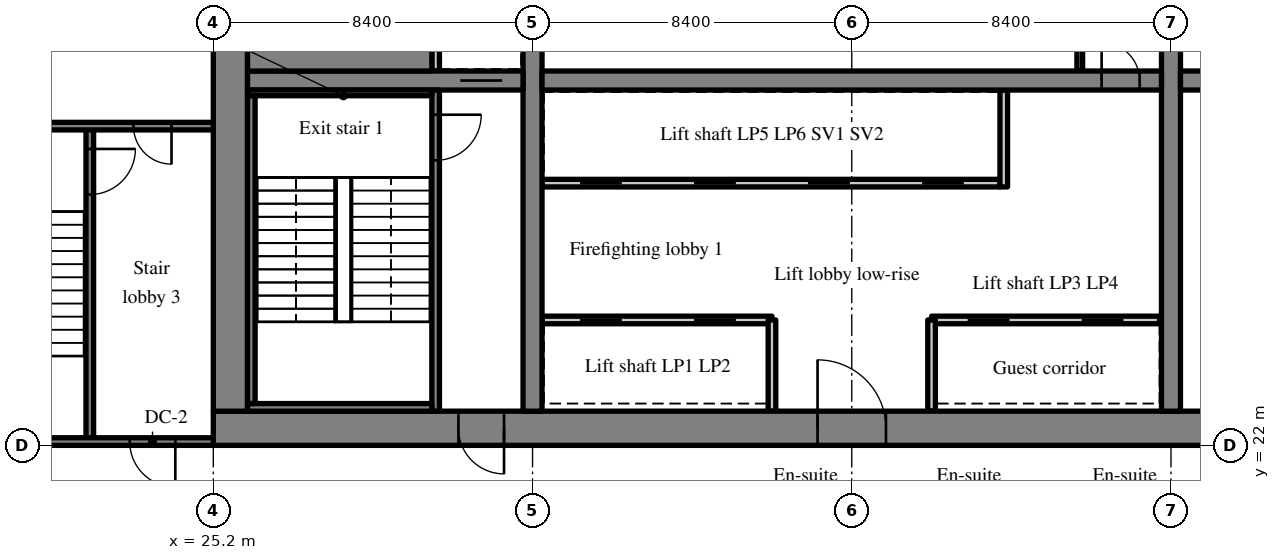
"""IFC4 building model, lengths in metres.
Left out: names, types, materials, properties, quantities, classifications, styles, units other than length and angle.
Written with IfcOpenShell. Run it as: python <this file> out.ifc"""

import sys

from ifc_helpers import new_model, si_unit, direction, frame, frame_2d, origin, place, context, subcontext, project, spatial, rectangle, extrude, source, transform, mapped, element, fill, save


model = new_model("IFC4")
c1 = context("Model", 3, precision=1e-05, world=origin(), true_north=direction((0.0, 1.0)))
c2 = subcontext(c1, "Body", "Model", "MODEL_VIEW")
j1 = project(units=[si_unit("LENGTHUNIT", "METRE"), si_unit("PLANEANGLEUNIT", "RADIAN")], contexts=[c1])
p1 = place(None, origin())
s1 = spatial("IfcSite", under=j1, at=p1, CompositionType="ELEMENT")
p2 = place(p1, origin())
s2 = spatial("IfcBuilding", under=s1, at=p2, CompositionType="ELEMENT")
p3 = place(p2, frame((0.0, 0.0, 125.6)))
s3 = spatial("IfcBuildingStorey", under=s2, at=p3, CompositionType="ELEMENT", Elevation=125.6)
m1 = source(origin(), c2, "Body", "SweptSolid", [
    extrude(rectangle(XDim=50.4, YDim=0.9, at=frame_2d((25.2, 0.0))), origin(), (0.0, 0.0, 1.0), 3.52),
])
p4 = place(p3, frame((25.2, 22.45, 0.0), z_axis=(0.0, 0.0, 1.0), x_axis=(1.0, 0.0, 0.0)))
e1 = element("IfcWall", 1, at=p4, inside=s3, PredefinedType="SHEAR", context=c2, shape_type="MappedRepresentation", body=[
    mapped(m1, transform((0.0, 0.0, 0.0), scale=1.0)),
])
m2 = source(origin(), c2, "Body", "SweptSolid", [
    extrude(rectangle(XDim=1.8, YDim=2.1, at=frame_2d((0.9, 1.05))), frame((0.0, 0.46, 0.0), z_axis=(0.0, -1.0, 0.0), x_axis=(1.0, 0.0, 0.0)), (0.0, 0.0, 1.0), 0.92),
])
p5 = place(p4, frame((15.9, 0.0, 0.0)))
e2 = element("IfcOpeningElement", 2, at=p5, cuts=e1, PredefinedType="OPENING", context=c2, shape_type="MappedRepresentation", body=[
    mapped(m2, transform((0.0, 0.0, 0.0), scale=1.0)),
])
m3 = source(origin(), c2, "Body", "SweptSolid", [
    extrude(rectangle(XDim=1.2, YDim=2.1, at=frame_2d((0.6, 1.05))), frame((0.0, 0.46, 0.0), z_axis=(0.0, -1.0, 0.0), x_axis=(1.0, 0.0, 0.0)), (0.0, 0.0, 1.0), 0.92),
])
p6 = place(p4, frame((26.975, 0.0, 0.0)))
e3 = element("IfcOpeningElement", 3, at=p6, cuts=e1, PredefinedType="OPENING", context=c2, shape_type="MappedRepresentation", body=[
    mapped(m3, transform((0.0, 0.0, 0.0), scale=1.0)),
])
m4 = source(origin(), c2, "Body", "SweptSolid", [
    extrude(rectangle(XDim=0.9, YDim=2.1, at=frame_2d((0.45, 1.05))), frame((0.0, 0.46, 0.0), z_axis=(0.0, -1.0, 0.0), x_axis=(1.0, 0.0, 0.0)), (0.0, 0.0, 1.0), 0.92),
])
p7 = place(p4, frame((33.75, 0.0, 0.0)))
e4 = element("IfcOpeningElement", 4, at=p7, cuts=e1, PredefinedType="OPENING", context=c2, shape_type="MappedRepresentation", body=[
    mapped(m4, transform((0.0, 0.0, 0.0), scale=1.0)),
])
p8 = place(p4, frame((30.75, 0.0, 0.0)))
e5 = element("IfcOpeningElement", 5, at=p8, cuts=e1, PredefinedType="OPENING", context=c2, shape_type="MappedRepresentation", body=[
    mapped(m4, transform((0.0, 0.0, 0.0), scale=1.0)),
])
p9 = place(p4, frame((38.275, 0.0, 0.0)))
e6 = element("IfcOpeningElement", 6, at=p9, cuts=e1, PredefinedType="OPENING", context=c2, shape_type="MappedRepresentation", body=[
    mapped(m4, transform((0.0, 0.0, 0.0), scale=1.0)),
])
p10 = place(p4, frame((6.45, 0.0, 0.0)))
e7 = element("IfcOpeningElement", 7, at=p10, cuts=e1, PredefinedType="OPENING", context=c2, shape_type="MappedRepresentation", body=[
    mapped(m3, transform((0.0, 0.0, 0.0), scale=1.0)),
])
p11 = place(p4, frame((47.775, 0.0, 0.0)))
e8 = element("IfcOpeningElement", 8, at=p11, cuts=e1, PredefinedType="OPENING", context=c2, shape_type="MappedRepresentation", body=[
    mapped(m3, transform((0.0, 0.0, 0.0), scale=1.0)),
])
m5 = source(origin(), c2, "Body", "SweptSolid", [
    extrude(rectangle(XDim=18.2, YDim=0.9, at=frame_2d((9.1, 0.0))), origin(), (0.0, 0.0, 1.0), 3.52),
])
p12 = place(p3, frame((25.65, 22.9, 0.0), z_axis=(0.0, 0.0, 1.0), x_axis=(0.0, 1.0, 0.0)))
e9 = element("IfcWall", 9, at=p12, inside=s3, PredefinedType="SHEAR", context=c2, shape_type="MappedRepresentation", body=[
    mapped(m5, transform((0.0, 0.0, 0.0), scale=1.0)),
])
m6 = source(origin(), c2, "Body", "SweptSolid", [
    extrude(rectangle(XDim=18.2, YDim=0.5, at=frame_2d((9.1, 0.0))), origin(), (0.0, 0.0, 1.0), 3.52),
])
p13 = place(p3, frame((33.6, 22.9, 0.0), z_axis=(0.0, 0.0, 1.0), x_axis=(0.0, 1.0, 0.0)))
e10 = element("IfcWall", 10, at=p13, inside=s3, PredefinedType="SHEAR", context=c2, shape_type="MappedRepresentation", body=[
    mapped(m6, transform((0.0, 0.0, 0.0), scale=1.0)),
])
m7 = source(origin(), c2, "Body", "SweptSolid", [
    extrude(rectangle(XDim=1.1, YDim=2.1, at=frame_2d((0.55, 1.05))), frame((0.0, 0.26, 0.0), z_axis=(0.0, -1.0, 0.0), x_axis=(1.0, 0.0, 0.0)), (0.0, 0.0, 1.0), 0.52),
])
p14 = place(p13, frame((12.55, 0.0, 0.0)))
e11 = element("IfcOpeningElement", 11, at=p14, cuts=e10, PredefinedType="OPENING", context=c2, shape_type="MappedRepresentation", body=[
    mapped(m7, transform((0.0, 0.0, 0.0), scale=1.0)),
])
p15 = place(p3, frame((50.4, 22.9, 0.0), z_axis=(0.0, 0.0, 1.0), x_axis=(0.0, 1.0, 0.0)))
e12 = element("IfcWall", 12, at=p15, inside=s3, PredefinedType="SHEAR", context=c2, shape_type="MappedRepresentation", body=[
    mapped(m6, transform((0.0, 0.0, 0.0), scale=1.0)),
])
p16 = place(p15, frame((12.55, 0.0, 0.0)))
e13 = element("IfcOpeningElement", 13, at=p16, cuts=e12, PredefinedType="OPENING", context=c2, shape_type="MappedRepresentation", body=[
    mapped(m7, transform((0.0, 0.0, 0.0), scale=1.0)),
])
m8 = source(origin(), c2, "Body", "SweptSolid", [
    extrude(rectangle(XDim=7.25, YDim=0.5, at=frame_2d((3.625, 0.0))), origin(), (0.0, 0.0, 1.0), 3.52),
])
p17 = place(p3, frame((26.1, 31.6, 0.0), z_axis=(0.0, 0.0, 1.0), x_axis=(1.0, 0.0, 0.0)))
e14 = element("IfcWall", 14, at=p17, inside=s3, PredefinedType="SHEAR", context=c2, shape_type="MappedRepresentation", body=[
    mapped(m8, transform((0.0, 0.0, 0.0), scale=1.0)),
])
p18 = place(p17, frame((5.6, 0.0, 0.0)))
e15 = element("IfcOpeningElement", 15, at=p18, cuts=e14, PredefinedType="OPENING", context=c2, shape_type="MappedRepresentation", body=[
    mapped(m7, transform((0.0, 0.0, 0.0), scale=1.0)),
])
m9 = source(origin(), c2, "Body", "SweptSolid", [
    extrude(rectangle(XDim=16.3, YDim=0.5, at=frame_2d((8.15, 0.0))), origin(), (0.0, 0.0, 1.0), 3.52),
])
p19 = place(p3, frame((33.85, 31.6, 0.0), z_axis=(0.0, 0.0, 1.0), x_axis=(1.0, 0.0, 0.0)))
e16 = element("IfcWall", 16, at=p19, inside=s3, PredefinedType="SHEAR", context=c2, shape_type="MappedRepresentation", body=[
    mapped(m9, transform((0.0, 0.0, 0.0), scale=1.0)),
])
m10 = source(origin(), c2, "Body", "SweptSolid", [
    extrude(rectangle(XDim=1.0, YDim=2.1, at=frame_2d((0.5, 1.05))), frame((0.0, 0.26, 0.0), z_axis=(0.0, -1.0, 0.0), x_axis=(1.0, 0.0, 0.0)), (0.0, 0.0, 1.0), 0.52),
])
p20 = place(p19, frame((14.725, 0.0, 0.0)))
e17 = element("IfcOpeningElement", 17, at=p20, cuts=e16, PredefinedType="OPENING", context=c2, shape_type="MappedRepresentation", body=[
    mapped(m10, transform((0.0, 0.0, 0.0), scale=1.0)),
])
m11 = source(origin(), c2, "Body", "SweptSolid", [
    extrude(rectangle(XDim=16.3, YDim=0.5, at=frame_2d((8.15, 0.0))), origin(), (0.0, 0.0, 1.0), 3.52),
])
p21 = place(p3, frame((50.65, 31.6, 0.0), z_axis=(0.0, 0.0, 1.0), x_axis=(1.0, 0.0, 0.0)))
e18 = element("IfcWall", 18, at=p21, inside=s3, PredefinedType="SHEAR", context=c2, shape_type="MappedRepresentation", body=[
    mapped(m11, transform((0.0, 0.0, 0.0), scale=1.0)),
])
p22 = place(p21, frame((0.575, 0.0, 0.0)))
e19 = element("IfcOpeningElement", 19, at=p22, cuts=e18, PredefinedType="OPENING", context=c2, shape_type="MappedRepresentation", body=[
    mapped(m10, transform((0.0, 0.0, 0.0), scale=1.0)),
])
m12 = source(origin(), c2, "Body", "SweptSolid", [
    extrude(rectangle(XDim=6.05, YDim=0.2, at=frame_2d((3.025, 0.0))), origin(), (0.0, 0.0, 1.0), 3.52),
])
p23 = place(p3, frame((33.85, 25.3, 0.0), z_axis=(0.0, 0.0, 1.0), x_axis=(1.0, 0.0, 0.0)))
e20 = element("IfcWall", 20, at=p23, inside=s3, PredefinedType="SOLIDWALL", context=c2, shape_type="MappedRepresentation", body=[
    mapped(m12, transform((0.0, 0.0, 0.0), scale=1.0)),
])
m13 = source(origin(), c2, "Body", "SweptSolid", [
    extrude(rectangle(XDim=1.1, YDim=2.1, at=frame_2d((0.55, 1.05))), frame((0.0, 0.11, 0.0), z_axis=(0.0, -1.0, 0.0), x_axis=(1.0, 0.0, 0.0)), (0.0, 0.0, 1.0), 0.22),
])
p24 = place(p23, frame((1.0, 0.0, 0.0)))
e21 = element("IfcOpeningElement", 21, at=p24, cuts=e20, PredefinedType="OPENING", context=c2, shape_type="MappedRepresentation", body=[
    mapped(m13, transform((0.0, 0.0, 0.0), scale=1.0)),
])
p25 = place(p23, frame((4.0, 0.0, 0.0)))
e22 = element("IfcOpeningElement", 22, at=p25, cuts=e20, PredefinedType="OPENING", context=c2, shape_type="MappedRepresentation", body=[
    mapped(m13, transform((0.0, 0.0, 0.0), scale=1.0)),
])
m14 = source(origin(), c2, "Body", "SweptSolid", [
    extrude(rectangle(XDim=6.0, YDim=0.2, at=frame_2d((3.0, 0.0))), origin(), (0.0, 0.0, 1.0), 3.52),
])
p26 = place(p3, frame((44.1, 25.3, 0.0), z_axis=(0.0, 0.0, 1.0), x_axis=(1.0, 0.0, 0.0)))
e23 = element("IfcWall", 23, at=p26, inside=s3, PredefinedType="SOLIDWALL", context=c2, shape_type="MappedRepresentation", body=[
    mapped(m14, transform((0.0, 0.0, 0.0), scale=1.0)),
])
p27 = place(p26, frame((0.95, 0.0, 0.0)))
e24 = element("IfcOpeningElement", 24, at=p27, cuts=e23, PredefinedType="OPENING", context=c2, shape_type="MappedRepresentation", body=[
    mapped(m13, transform((0.0, 0.0, 0.0), scale=1.0)),
])
p28 = place(p26, frame((3.95, 0.0, 0.0)))
e25 = element("IfcOpeningElement", 25, at=p28, cuts=e23, PredefinedType="OPENING", context=c2, shape_type="MappedRepresentation", body=[
    mapped(m13, transform((0.0, 0.0, 0.0), scale=1.0)),
])
m15 = source(origin(), c2, "Body", "SweptSolid", [
    extrude(rectangle(XDim=12.05, YDim=0.2, at=frame_2d((6.025, 0.0))), origin(), (0.0, 0.0, 1.0), 3.52),
])
p29 = place(p3, frame((33.85, 28.9, 0.0), z_axis=(0.0, 0.0, 1.0), x_axis=(1.0, 0.0, 0.0)))
e26 = element("IfcWall", 26, at=p29, inside=s3, PredefinedType="SOLIDWALL", context=c2, shape_type="MappedRepresentation", body=[
    mapped(m15, transform((0.0, 0.0, 0.0), scale=1.0)),
])
p30 = place(p29, frame((1.0, 0.0, 0.0)))
e27 = element("IfcOpeningElement", 27, at=p30, cuts=e26, PredefinedType="OPENING", context=c2, shape_type="MappedRepresentation", body=[
    mapped(m13, transform((0.0, 0.0, 0.0), scale=1.0)),
])
p31 = place(p29, frame((4.0, 0.0, 0.0)))
e28 = element("IfcOpeningElement", 28, at=p31, cuts=e26, PredefinedType="OPENING", context=c2, shape_type="MappedRepresentation", body=[
    mapped(m13, transform((0.0, 0.0, 0.0), scale=1.0)),
])
p32 = place(p29, frame((7.0, 0.0, 0.0)))
e29 = element("IfcOpeningElement", 29, at=p32, cuts=e26, PredefinedType="OPENING", context=c2, shape_type="MappedRepresentation", body=[
    mapped(m13, transform((0.0, 0.0, 0.0), scale=1.0)),
])
p33 = place(p29, frame((10.0, 0.0, 0.0)))
e30 = element("IfcOpeningElement", 30, at=p33, cuts=e26, PredefinedType="OPENING", context=c2, shape_type="MappedRepresentation", body=[
    mapped(m13, transform((0.0, 0.0, 0.0), scale=1.0)),
])
m16 = source(origin(), c2, "Body", "SweptSolid", [
    extrude(rectangle(XDim=2.4, YDim=0.2, at=frame_2d((1.2, 0.0))), origin(), (0.0, 0.0, 1.0), 3.52),
])
for number, where, z_axis, x_axis in (
    (31, (39.9, 22.9, 0.0), (0.0, 0.0, 1.0), (0.0, 1.0, 0.0)),
    (32, (44.1, 22.9, 0.0), (0.0, 0.0, 1.0), (0.0, 1.0, 0.0)),
):
    element("IfcWall", number, at=place(p3, frame(where, z_axis=z_axis, x_axis=x_axis)), inside=s3, PredefinedType="SOLIDWALL", context=c2, shape_type="MappedRepresentation", body=[
        mapped(m16, transform((0.0, 0.0, 0.0), scale=1.0)),
    ])
m17 = source(origin(), c2, "Body", "SweptSolid", [
    extrude(rectangle(XDim=2.55, YDim=0.2, at=frame_2d((1.275, 0.0))), origin(), (0.0, 0.0, 1.0), 3.52),
])
p34 = place(p3, frame((46.0, 28.8, 0.0), z_axis=(0.0, 0.0, 1.0), x_axis=(0.0, 1.0, 0.0)))
e33 = element("IfcWall", 33, at=p34, inside=s3, PredefinedType="SOLIDWALL", context=c2, shape_type="MappedRepresentation", body=[
    mapped(m17, transform((0.0, 0.0, 0.0), scale=1.0)),
])
m18 = source(origin(), c2, "Body", "SweptSolid", [
    extrude(rectangle(XDim=3.15, YDim=0.15, at=frame_2d((1.575, 0.0))), origin(), (0.0, 0.0, 1.0), 3.52),
])
p35 = place(p3, frame((48.0, 31.85, 0.0), z_axis=(0.0, 0.0, 1.0), x_axis=(0.0, 1.0, 0.0)))
e34 = element("IfcWall", 34, at=p35, inside=s3, PredefinedType="PARTITIONING", context=c2, shape_type="MappedRepresentation", body=[
    mapped(m18, transform((0.0, 0.0, 0.0), scale=1.0)),
])
m19 = source(origin(), c2, "Body", "SweptSolid", [
    extrude(rectangle(XDim=8.45, YDim=0.2, at=frame_2d((4.225, 0.0))), origin(), (0.0, 0.0, 1.0), 3.52),
])
p36 = place(p3, frame((31.05, 22.9, 0.0), z_axis=(0.0, 0.0, 1.0), x_axis=(0.0, 1.0, 0.0)))
e35 = element("IfcWall", 35, at=p36, inside=s3, PredefinedType="SOLIDWALL", context=c2, shape_type="MappedRepresentation", body=[
    mapped(m19, transform((0.0, 0.0, 0.0), scale=1.0)),
])
m20 = source(origin(), c2, "Body", "SweptSolid", [
    extrude(rectangle(XDim=1.2, YDim=2.1, at=frame_2d((0.6, 1.05))), frame((0.0, 0.11, 0.0), z_axis=(0.0, -1.0, 0.0), x_axis=(1.0, 0.0, 0.0)), (0.0, 0.0, 1.0), 0.22),
])
p37 = place(p36, frame((6.6, 0.0, 0.0)))
e36 = element("IfcOpeningElement", 36, at=p37, cuts=e35, PredefinedType="OPENING", context=c2, shape_type="MappedRepresentation", body=[
    mapped(m20, transform((0.0, 0.0, 0.0), scale=1.0)),
])
m21 = source(origin(), c2, "Body", "SweptSolid", [
    extrude(rectangle(XDim=1.75, YDim=0.2, at=frame_2d((0.875, 0.0))), origin(), (0.0, 0.0, 1.0), 3.52),
])
p38 = place(p3, frame((31.05, 31.85, 0.0), z_axis=(0.0, 0.0, 1.0), x_axis=(0.0, 1.0, 0.0)))
e37 = element("IfcWall", 37, at=p38, inside=s3, PredefinedType="SOLIDWALL", context=c2, shape_type="MappedRepresentation", body=[
    mapped(m21, transform((0.0, 0.0, 0.0), scale=1.0)),
])
m22 = source(origin(), c2, "Body", "SweptSolid", [
    extrude(rectangle(XDim=8.3, YDim=0.2, at=frame_2d((4.15, 0.0))), origin(), (0.0, 0.0, 1.0), 3.52),
])
p39 = place(p3, frame((21.95, 22.1, 0.0), z_axis=(0.0, 0.0, 1.0), x_axis=(0.0, 1.0, 0.0)))
e38 = element("IfcWall", 38, at=p39, inside=s3, PredefinedType="SOLIDWALL", context=c2, shape_type="MappedRepresentation", body=[
    mapped(m22, transform((0.0, 0.0, 0.0), scale=1.0)),
])
p40 = place(p39, frame((6.5, 0.0, 0.0)))
e39 = element("IfcOpeningElement", 39, at=p40, cuts=e38, PredefinedType="OPENING", context=c2, shape_type="MappedRepresentation", body=[
    mapped(m20, transform((0.0, 0.0, 0.0), scale=1.0)),
])
m23 = source(origin(), c2, "Body", "SweptSolid", [
    extrude(rectangle(XDim=8.225, YDim=0.2, at=frame_2d((4.112, 0.0))), origin(), (0.0, 0.0, 1.0), 3.52),
])
p41 = place(p3, frame((16.975, 22.1, 0.0), z_axis=(0.0, 0.0, 1.0), x_axis=(1.0, 0.0, 0.0)))
e40 = element("IfcWall", 40, at=p41, inside=s3, PredefinedType="SOLIDWALL", context=c2, shape_type="MappedRepresentation", body=[
    mapped(m23, transform((0.0, 0.0, 0.0), scale=1.0)),
])
p42 = place(p41, frame((6.025, 0.0, 0.0)))
e41 = element("IfcOpeningElement", 41, at=p42, cuts=e40, PredefinedType="OPENING", context=c2, shape_type="MappedRepresentation", body=[
    mapped(m20, transform((0.0, 0.0, 0.0), scale=1.0)),
])
p43 = place(p3, frame((16.975, 30.4, 0.0), z_axis=(0.0, 0.0, 1.0), x_axis=(1.0, 0.0, 0.0)))
e42 = element("IfcWall", 42, at=p43, inside=s3, PredefinedType="SOLIDWALL", context=c2, shape_type="MappedRepresentation", body=[
    mapped(m23, transform((0.0, 0.0, 0.0), scale=1.0)),
])
m24 = source(origin(), c2, "Body", "SweptSolid", [
    extrude(rectangle(XDim=1.0, YDim=2.1, at=frame_2d((0.5, 1.05))), frame((0.0, 0.11, 0.0), z_axis=(0.0, -1.0, 0.0), x_axis=(1.0, 0.0, 0.0)), (0.0, 0.0, 1.0), 0.22),
])
p44 = place(p43, frame((6.125, 0.0, 0.0)))
e43 = element("IfcOpeningElement", 43, at=p44, cuts=e42, PredefinedType="OPENING", context=c2, shape_type="MappedRepresentation", body=[
    mapped(m24, transform((0.0, 0.0, 0.0), scale=1.0)),
])
m25 = source(origin(), c2, "Body", "SweptSolid", [
    extrude(rectangle(XDim=4.85, YDim=0.2, at=frame_2d((2.425, 0.0))), origin(), (0.0, 0.0, 1.0), 3.52),
])
p45 = place(p3, frame((26.1, 23.0, 0.0), z_axis=(0.0, 0.0, 1.0), x_axis=(1.0, 0.0, 0.0)))
e44 = element("IfcWall", 44, at=p45, inside=s3, PredefinedType="SOLIDWALL", context=c2, shape_type="MappedRepresentation", body=[
    mapped(m25, transform((0.0, 0.0, 0.0), scale=1.0)),
])
m26 = source(origin(), c2, "Body", "SweptSolid", [
    extrude(rectangle(XDim=4.85, YDim=0.15, at=frame_2d((2.425, 0.0))), origin(), (0.0, 0.0, 1.0), 3.52),
])
p46 = place(p3, frame((26.1, 31.275, 0.0), z_axis=(0.0, 0.0, 1.0), x_axis=(1.0, 0.0, 0.0)))
e45 = element("IfcWall", 45, at=p46, inside=s3, PredefinedType="SOLIDWALL", context=c2, shape_type="MappedRepresentation", body=[
    mapped(m26, transform((0.0, 0.0, 0.0), scale=1.0)),
])
m27 = source(origin(), c2, "Body", "SweptSolid", [
    extrude(rectangle(XDim=8.1, YDim=0.2, at=frame_2d((4.05, 0.0))), origin(), (0.0, 0.0, 1.0), 3.52),
])
p47 = place(p3, frame((26.2, 23.1, 0.0), z_axis=(0.0, 0.0, 1.0), x_axis=(0.0, 1.0, 0.0)))
e46 = element("IfcWall", 46, at=p47, inside=s3, PredefinedType="SOLIDWALL", context=c2, shape_type="MappedRepresentation", body=[
    mapped(m27, transform((0.0, 0.0, 0.0), scale=1.0)),
])
m28 = source(origin(), c2, "Body", "SweptSolid", [
    extrude(rectangle(XDim=4.85, YDim=0.95, at=frame_2d((2.425, 0.0))), origin(), (0.0, 0.0, 1.0), 3.52),
])
p48 = place(p3, frame((26.1, 32.325, 0.0), z_axis=(0.0, 0.0, 1.0), x_axis=(1.0, 0.0, 0.0)))
e47 = element("IfcWall", 47, at=p48, inside=s3, PredefinedType="SOLIDWALL", context=c2, shape_type="MappedRepresentation", body=[
    mapped(m28, transform((0.0, 0.0, 0.0), scale=1.0)),
])
m29 = source(origin(), c2, "Body", "SweptSolid", [
    extrude(rectangle(XDim=1.8, YDim=2.1, at=frame_2d((0.9, 1.05))), frame((0.0, 0.375, 0.0), z_axis=(0.0, -1.0, 0.0), x_axis=(1.0, 0.0, 0.0)), (0.0, 0.0, 1.0), 0.05),
])
p49 = place(p5, origin())
e48 = element("IfcDoor", 48, at=p49, inside=s3, OperationType="DOUBLE_DOOR_SINGLE_SWING", PredefinedType="DOOR", context=c2, shape_type="MappedRepresentation", body=[
    mapped(m29, transform((0.0, 0.0, 0.0), scale=1.0)),
])
fill(e2, e48)
m30 = source(origin(), c2, "Body", "SweptSolid", [
    extrude(rectangle(XDim=1.0, YDim=2.1, at=frame_2d((0.5, 1.05))), frame((0.0, 0.025, 0.0), z_axis=(0.0, -1.0, 0.0), x_axis=(1.0, 0.0, 0.0)), (0.0, 0.0, 1.0), 0.05),
])
p50 = place(p20, origin())
e49 = element("IfcDoor", 49, at=p50, inside=s3, OperationType="SINGLE_SWING_LEFT", PredefinedType="DOOR", context=c2, shape_type="MappedRepresentation", body=[
    mapped(m30, transform((0.0, 0.0, 0.0), scale=1.0)),
])
fill(e17, e49)
m31 = source(origin(), c2, "Body", "SweptSolid", [
    extrude(rectangle(XDim=1.1, YDim=2.1, at=frame_2d((0.55, 1.05))), frame((0.0, 0.025, 0.0), z_axis=(0.0, -1.0, 0.0), x_axis=(1.0, 0.0, 0.0)), (0.0, 0.0, 1.0), 0.05),
])
p51 = place(p24, origin())
e50 = element("IfcDoor", 50, at=p51, inside=s3, OperationType="SLIDING_TO_LEFT", PredefinedType="DOOR", context=c2, shape_type="MappedRepresentation", body=[
    mapped(m31, transform((0.0, 0.0, 0.0), scale=1.0)),
])
fill(e21, e50)
p52 = place(p25, origin())
e51 = element("IfcDoor", 51, at=p52, inside=s3, OperationType="SLIDING_TO_RIGHT", PredefinedType="DOOR", context=c2, shape_type="MappedRepresentation", body=[
    mapped(m31, transform((0.0, 0.0, 0.0), scale=1.0)),
])
fill(e22, e51)
p53 = place(p27, origin())
e52 = element("IfcDoor", 52, at=p53, inside=s3, OperationType="SLIDING_TO_LEFT", PredefinedType="DOOR", context=c2, shape_type="MappedRepresentation", body=[
    mapped(m31, transform((0.0, 0.0, 0.0), scale=1.0)),
])
fill(e24, e52)
p54 = place(p28, origin())
e53 = element("IfcDoor", 53, at=p54, inside=s3, OperationType="SLIDING_TO_RIGHT", PredefinedType="DOOR", context=c2, shape_type="MappedRepresentation", body=[
    mapped(m31, transform((0.0, 0.0, 0.0), scale=1.0)),
])
fill(e25, e53)
p55 = place(p30, origin())
e54 = element("IfcDoor", 54, at=p55, inside=s3, OperationType="SLIDING_TO_LEFT", PredefinedType="DOOR", context=c2, shape_type="MappedRepresentation", body=[
    mapped(m31, transform((0.0, 0.0, 0.0), scale=1.0)),
])
fill(e27, e54)
p56 = place(p31, origin())
e55 = element("IfcDoor", 55, at=p56, inside=s3, OperationType="SLIDING_TO_RIGHT", PredefinedType="DOOR", context=c2, shape_type="MappedRepresentation", body=[
    mapped(m31, transform((0.0, 0.0, 0.0), scale=1.0)),
])
fill(e28, e55)
p57 = place(p32, origin())
e56 = element("IfcDoor", 56, at=p57, inside=s3, OperationType="SLIDING_TO_LEFT", PredefinedType="DOOR", context=c2, shape_type="MappedRepresentation", body=[
    mapped(m31, transform((0.0, 0.0, 0.0), scale=1.0)),
])
fill(e29, e56)
p58 = place(p33, origin())
e57 = element("IfcDoor", 57, at=p58, inside=s3, OperationType="SLIDING_TO_RIGHT", PredefinedType="DOOR", context=c2, shape_type="MappedRepresentation", body=[
    mapped(m31, transform((0.0, 0.0, 0.0), scale=1.0)),
])
fill(e30, e57)
m32 = source(origin(), c2, "Body", "SweptSolid", [
    extrude(rectangle(XDim=1.2, YDim=2.1, at=frame_2d((0.6, 1.05))), frame((0.0, 0.025, 0.0), z_axis=(0.0, -1.0, 0.0), x_axis=(1.0, 0.0, 0.0)), (0.0, 0.0, 1.0), 0.05),
])
p59 = place(p37, origin())
e58 = element("IfcDoor", 58, at=p59, inside=s3, OperationType="SINGLE_SWING_RIGHT", PredefinedType="DOOR", context=c2, shape_type="MappedRepresentation", body=[
    mapped(m32, transform((0.0, 0.0, 0.0), scale=1.0)),
])
fill(e36, e58)
m33 = source(origin(), c2, "Body", "SweptSolid", [
    extrude(rectangle(XDim=1.2, YDim=2.1, at=frame_2d((0.6, 1.05))), frame((0.0, 0.375, 0.0), z_axis=(0.0, -1.0, 0.0), x_axis=(1.0, 0.0, 0.0)), (0.0, 0.0, 1.0), 0.05),
])
p60 = place(p10, origin())
e59 = element("IfcDoor", 59, at=p60, inside=s3, OperationType="SINGLE_SWING_RIGHT", PredefinedType="DOOR", context=c2, shape_type="MappedRepresentation", body=[
    mapped(m33, transform((0.0, 0.0, 0.0), scale=1.0)),
])
fill(e7, e59)
p61 = place(p18, origin())
e60 = element("IfcDoor", 60, at=p61, inside=s3, OperationType="SLIDING_TO_LEFT", PredefinedType="DOOR", context=c2, shape_type="MappedRepresentation", body=[
    mapped(m31, transform((0.0, 0.0, 0.0), scale=1.0)),
])
fill(e15, e60)
p62 = place(p40, origin())
e61 = element("IfcDoor", 61, at=p62, inside=s3, OperationType="SINGLE_SWING_RIGHT", PredefinedType="DOOR", context=c2, shape_type="MappedRepresentation", body=[
    mapped(m32, transform((0.0, 0.0, 0.0), scale=1.0)),
])
fill(e39, e61)
p63 = place(p42, origin())
e62 = element("IfcDoor", 62, at=p63, inside=s3, OperationType="SINGLE_SWING_RIGHT", PredefinedType="DOOR", context=c2, shape_type="MappedRepresentation", body=[
    mapped(m32, transform((0.0, 0.0, 0.0), scale=1.0)),
])
fill(e41, e62)
p64 = place(p44, origin())
e63 = element("IfcDoor", 63, at=p64, inside=s3, OperationType="SINGLE_SWING_RIGHT", PredefinedType="DOOR", context=c2, shape_type="MappedRepresentation", body=[
    mapped(m30, transform((0.0, 0.0, 0.0), scale=1.0)),
])
fill(e43, e63)
save(model, sys.argv[1])
